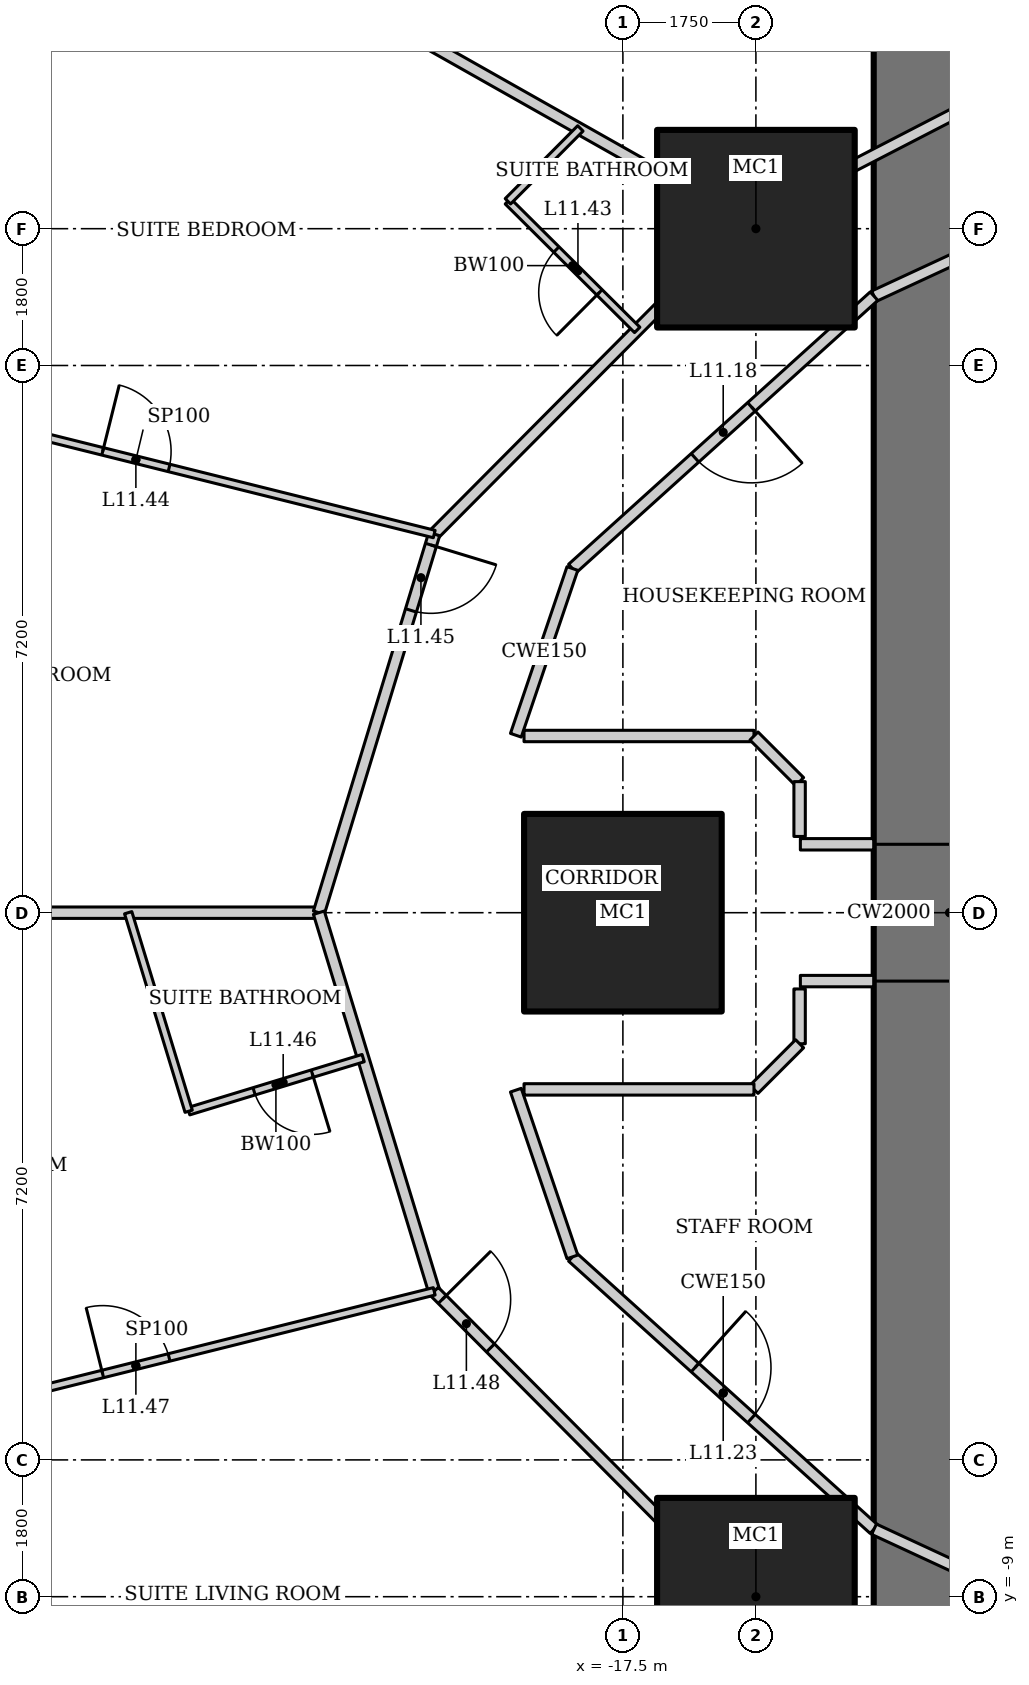
"""IFC4 building model, lengths in metres.
Left out: names, types, materials, properties, quantities, classifications, styles, units other than length and angle.
Written with IfcOpenShell. Run it as: python <this file> out.ifc"""

import sys

from ifc_helpers import new_model, si_unit, direction, frame, frame_2d, origin, origin_2d, place, context, subcontext, project, spatial, rectangle, hollow_rectangle, extrude, element, fill, save


model = new_model("IFC4")
c1 = context("Model", 3, precision=1e-05, world=origin(), true_north=direction((0.0, 1.0)))
c2 = subcontext(c1, "Body", "Model", "MODEL_VIEW")
j1 = project(units=[si_unit("LENGTHUNIT", "METRE"), si_unit("PLANEANGLEUNIT", "RADIAN")], contexts=[c1])
p1 = place(None, origin())
s1 = spatial("IfcSite", under=j1, at=p1, CompositionType="ELEMENT")
p2 = place(p1, origin())
s2 = spatial("IfcBuilding", under=s1, at=p2, CompositionType="ELEMENT")
p3 = place(p2, frame((0.0, 0.0, 55.0)))
s3 = spatial("IfcBuildingStorey", under=s2, at=p3, CompositionType="ELEMENT", Elevation=55.0)
for number, where, z_axis, x_axis in (
    (1, (-15.75, 9.0, 0.0), (0.0, 0.0, 1.0), (1.0, 0.0, 0.0)),
    (2, (-17.5, 0.0, 0.0), (0.0, 0.0, 1.0), (1.0, 0.0, 0.0)),
    (3, (-15.75, -9.0, 0.0), (0.0, 0.0, 1.0), (1.0, 0.0, 0.0)),
):
    element("IfcColumn", number, at=place(p3, frame(where, z_axis=z_axis, x_axis=x_axis)), inside=s3, PredefinedType="COLUMN", context=c2, shape_type="SweptSolid", body=[
        extrude(hollow_rectangle(XDim=2.6, YDim=2.6, WallThickness=0.13, at=origin_2d()), origin(), (0.0, 0.0, 1.0), 3.6),
    ])
p4 = place(p3, frame((-13.2, 13.0, 0.0), z_axis=(0.0, 0.0, 1.0), x_axis=(0.0, -1.0, 0.0)))
e4 = element("IfcWall", 4, at=p4, inside=s3, PredefinedType="SHEAR", context=c2, shape_type="SweptSolid", body=[
    extrude(rectangle(XDim=26.0, YDim=2.0, at=frame_2d((13.0, 0.0))), origin(), (0.0, 0.0, 1.0), 3.6),
])
p5 = place(p4, frame((12.1, 0.0, 0.0)))
e5 = element("IfcOpeningElement", 5, at=p5, cuts=e4, PredefinedType="OPENING", context=c2, shape_type="SweptSolid", body=[
    extrude(rectangle(XDim=1.8, YDim=2.1, at=frame_2d((0.9, 1.05))), frame((0.0, 1.01, 0.0), z_axis=(0.0, -1.0, 0.0), x_axis=(1.0, 0.0, 0.0)), (0.0, 0.0, 1.0), 2.02),
])
p6 = place(p3, frame((-24.4, 13.957, 0.0), z_axis=(0.0, 0.0, 1.0), x_axis=(-0.583937613703, -0.811798536155, 0.0)))
e6 = element("IfcWall", 6, at=p6, inside=s3, PredefinedType="SOLIDWALL", context=c2, shape_type="SweptSolid", body=[
    extrude(rectangle(XDim=8.323, YDim=0.2, at=frame_2d((4.162, 0.0))), origin(), (0.0, 0.0, 1.0), 3.45),
])
p7 = place(p6, frame((2.961, 0.0, 0.5)))
e7 = element("IfcOpeningElement", 7, at=p7, cuts=e6, PredefinedType="OPENING", context=c2, shape_type="SweptSolid", body=[
    extrude(rectangle(XDim=2.4, YDim=2.2, at=frame_2d((1.2, 1.1))), frame((0.0, 0.11, 0.0), z_axis=(0.0, -1.0, 0.0), x_axis=(1.0, 0.0, 0.0)), (0.0, 0.0, 1.0), 0.22),
])
p8 = place(p3, frame((-29.26, -7.2, 0.0), z_axis=(0.0, 0.0, 1.0), x_axis=(0.583937613703, -0.811798536155, 0.0)))
e8 = element("IfcWall", 8, at=p8, inside=s3, PredefinedType="SOLIDWALL", context=c2, shape_type="SweptSolid", body=[
    extrude(rectangle(XDim=8.323, YDim=0.2, at=frame_2d((4.162, 0.0))), origin(), (0.0, 0.0, 1.0), 3.45),
])
p9 = place(p8, frame((2.961, 0.0, 0.5)))
e9 = element("IfcOpeningElement", 9, at=p9, cuts=e8, PredefinedType="OPENING", context=c2, shape_type="SweptSolid", body=[
    extrude(rectangle(XDim=2.4, YDim=2.2, at=frame_2d((1.2, 1.1))), frame((0.0, 0.11, 0.0), z_axis=(0.0, -1.0, 0.0), x_axis=(1.0, 0.0, 0.0)), (0.0, 0.0, 1.0), 0.22),
])
p10 = place(p3, frame((-24.435, 13.909, 0.0), z_axis=(0.0, 0.0, 1.0), x_axis=(0.870612006791, -0.491970256856, 0.0)))
e10 = element("IfcWall", 10, at=p10, inside=s3, PredefinedType="PARTITIONING", context=c2, shape_type="SweptSolid", body=[
    extrude(rectangle(XDim=9.802, YDim=0.15, at=frame_2d((4.901, 0.0))), origin(), (0.0, 0.0, 1.0), 2.693),
])
p11 = place(p3, frame((-30.821, 0.0, 0.0), z_axis=(0.0, 0.0, 1.0), x_axis=(1.0, 0.0, 0.0)))
e11 = element("IfcWall", 11, at=p11, inside=s3, PredefinedType="PARTITIONING", context=c2, shape_type="SweptSolid", body=[
    extrude(rectangle(XDim=9.321, YDim=0.15, at=frame_2d((4.66, 0.0))), origin(), (0.0, 0.0, 1.0), 2.528),
])
p12 = place(p3, frame((-24.435, -13.909, 0.0), z_axis=(0.0, 0.0, 1.0), x_axis=(0.870612006791, 0.491970256856, 0.0)))
e12 = element("IfcWall", 12, at=p12, inside=s3, PredefinedType="PARTITIONING", context=c2, shape_type="SweptSolid", body=[
    extrude(rectangle(XDim=9.802, YDim=0.15, at=frame_2d((4.901, 0.0))), origin(), (0.0, 0.0, 1.0), 2.693),
])
p13 = place(p3, frame((-11.147, 11.544, 0.0), z_axis=(0.0, 0.0, 1.0), x_axis=(-0.888333171507, -0.459199495209, 0.0)))
e13 = element("IfcWall", 13, at=p13, inside=s3, PredefinedType="PARTITIONING", context=c2, shape_type="SweptSolid", body=[
    extrude(rectangle(XDim=5.351, YDim=0.15, at=frame_2d((2.676, 0.0))), origin(), (0.0, 0.0, 1.0), 3.45),
])
p14 = place(p13, frame((0.15, 0.0, 0.0)))
e14 = element("IfcOpeningElement", 14, at=p14, cuts=e13, PredefinedType="OPENING", context=c2, shape_type="SweptSolid", body=[
    extrude(rectangle(XDim=0.9, YDim=2.1, at=frame_2d((0.45, 1.05))), frame((0.0, 0.085, 0.0), z_axis=(0.0, -1.0, 0.0), x_axis=(1.0, 0.0, 0.0)), (0.0, 0.0, 1.0), 0.17),
])
p15 = place(p3, frame((-15.901, 9.086, 0.0), z_axis=(0.0, 0.0, 1.0), x_axis=(-0.705121546414, -0.709086457904, 0.0)))
e15 = element("IfcWall", 15, at=p15, inside=s3, PredefinedType="PARTITIONING", context=c2, shape_type="SweptSolid", body=[
    extrude(rectangle(XDim=5.788, YDim=0.15, at=frame_2d((2.894, 0.0))), origin(), (0.0, 0.0, 1.0), 3.45),
])
p16 = place(p3, frame((-19.982, 4.982, 0.0), z_axis=(0.0, 0.0, 1.0), x_axis=(-0.291383581394, -0.95660629754, 0.0)))
e16 = element("IfcWall", 16, at=p16, inside=s3, PredefinedType="PARTITIONING", context=c2, shape_type="SweptSolid", body=[
    extrude(rectangle(XDim=5.208, YDim=0.15, at=frame_2d((2.604, 0.0))), origin(), (0.0, 0.0, 1.0), 3.45),
])
p17 = place(p16, frame((0.15, 0.0, 0.0)))
e17 = element("IfcOpeningElement", 17, at=p17, cuts=e16, PredefinedType="OPENING", context=c2, shape_type="SweptSolid", body=[
    extrude(rectangle(XDim=0.9, YDim=2.1, at=frame_2d((0.45, 1.05))), frame((0.0, 0.085, 0.0), z_axis=(0.0, -1.0, 0.0), x_axis=(1.0, 0.0, 0.0)), (0.0, 0.0, 1.0), 0.17),
])
p18 = place(p3, frame((-21.5, 0.0, 0.0), z_axis=(0.0, 0.0, 1.0), x_axis=(0.291383581394, -0.95660629754, 0.0)))
e18 = element("IfcWall", 18, at=p18, inside=s3, PredefinedType="PARTITIONING", context=c2, shape_type="SweptSolid", body=[
    extrude(rectangle(XDim=5.208, YDim=0.15, at=frame_2d((2.604, 0.0))), origin(), (0.0, 0.0, 1.0), 3.45),
])
p19 = place(p3, frame((-19.982, -4.982, 0.0), z_axis=(0.0, 0.0, 1.0), x_axis=(0.705121546414, -0.709086457904, 0.0)))
e19 = element("IfcWall", 19, at=p19, inside=s3, PredefinedType="PARTITIONING", context=c2, shape_type="SweptSolid", body=[
    extrude(rectangle(XDim=5.788, YDim=0.15, at=frame_2d((2.894, 0.0))), origin(), (0.0, 0.0, 1.0), 3.45),
])
p20 = place(p19, frame((0.15, 0.0, 0.0)))
e20 = element("IfcOpeningElement", 20, at=p20, cuts=e19, PredefinedType="OPENING", context=c2, shape_type="SweptSolid", body=[
    extrude(rectangle(XDim=0.9, YDim=2.1, at=frame_2d((0.45, 1.05))), frame((0.0, 0.085, 0.0), z_axis=(0.0, -1.0, 0.0), x_axis=(1.0, 0.0, 0.0)), (0.0, 0.0, 1.0), 0.17),
])
p21 = place(p3, frame((-15.901, -9.086, 0.0), z_axis=(0.0, 0.0, 1.0), x_axis=(0.888333171507, -0.459199495209, 0.0)))
e21 = element("IfcWall", 21, at=p21, inside=s3, PredefinedType="PARTITIONING", context=c2, shape_type="SweptSolid", body=[
    extrude(rectangle(XDim=5.351, YDim=0.15, at=frame_2d((2.676, 0.0))), origin(), (0.0, 0.0, 1.0), 3.45),
])
p22 = place(p21, frame((4.301, 0.0, 0.0)))
e22 = element("IfcOpeningElement", 22, at=p22, cuts=e21, PredefinedType="OPENING", context=c2, shape_type="SweptSolid", body=[
    extrude(rectangle(XDim=0.9, YDim=2.1, at=frame_2d((0.45, 1.05))), frame((0.0, 0.085, 0.0), z_axis=(0.0, -1.0, 0.0), x_axis=(1.0, 0.0, 0.0)), (0.0, 0.0, 1.0), 0.17),
])
p23 = place(p3, frame((-9.801, 10.149, 0.0), z_axis=(0.0, 0.0, 1.0), x_axis=(-0.907279653965, -0.420527798727, 0.0)))
e23 = element("IfcWall", 23, at=p23, inside=s3, PredefinedType="PARTITIONING", context=c2, shape_type="SweptSolid", body=[
    extrude(rectangle(XDim=4.844, YDim=0.15, at=frame_2d((2.422, 0.0))), origin(), (0.0, 0.0, 1.0), 3.45),
])
p24 = place(p3, frame((-14.196, 8.112, 0.0), z_axis=(0.0, 0.0, 1.0), x_axis=(-0.742194222, -0.670184852731, 0.0)))
e24 = element("IfcWall", 24, at=p24, inside=s3, PredefinedType="PARTITIONING", context=c2, shape_type="SweptSolid", body=[
    extrude(rectangle(XDim=5.347, YDim=0.15, at=frame_2d((2.673, 0.0))), origin(), (0.0, 0.0, 1.0), 3.45),
])
p25 = place(p24, frame((2.173, 0.0, 0.0)))
e25 = element("IfcOpeningElement", 25, at=p25, cuts=e24, PredefinedType="OPENING", context=c2, shape_type="SweptSolid", body=[
    extrude(rectangle(XDim=1.0, YDim=2.1, at=frame_2d((0.5, 1.05))), frame((0.0, 0.085, 0.0), z_axis=(0.0, -1.0, 0.0), x_axis=(1.0, 0.0, 0.0)), (0.0, 0.0, 1.0), 0.17),
])
p26 = place(p3, frame((-18.164, -4.529, 0.0), z_axis=(0.0, 0.0, 1.0), x_axis=(0.742194222, -0.670184852731, 0.0)))
e26 = element("IfcWall", 26, at=p26, inside=s3, PredefinedType="PARTITIONING", context=c2, shape_type="SweptSolid", body=[
    extrude(rectangle(XDim=5.347, YDim=0.15, at=frame_2d((2.673, 0.0))), origin(), (0.0, 0.0, 1.0), 3.45),
])
p27 = place(p26, frame((2.173, 0.0, 0.0)))
e27 = element("IfcOpeningElement", 27, at=p27, cuts=e26, PredefinedType="OPENING", context=c2, shape_type="SweptSolid", body=[
    extrude(rectangle(XDim=1.0, YDim=2.1, at=frame_2d((0.5, 1.05))), frame((0.0, 0.085, 0.0), z_axis=(0.0, -1.0, 0.0), x_axis=(1.0, 0.0, 0.0)), (0.0, 0.0, 1.0), 0.17),
])
p28 = place(p3, frame((-14.196, -8.112, 0.0), z_axis=(0.0, 0.0, 1.0), x_axis=(0.907279653965, -0.420527798727, 0.0)))
e28 = element("IfcWall", 28, at=p28, inside=s3, PredefinedType="PARTITIONING", context=c2, shape_type="SweptSolid", body=[
    extrude(rectangle(XDim=4.844, YDim=0.15, at=frame_2d((2.422, 0.0))), origin(), (0.0, 0.0, 1.0), 3.45),
])
p29 = place(p3, frame((-17.311, 7.668, 0.0), z_axis=(0.0, 0.0, 1.0), x_axis=(-0.709138392716, 0.705069315724, 0.0)))
e29 = element("IfcWall", 29, at=p29, inside=s3, PredefinedType="PARTITIONING", context=c2, shape_type="SweptSolid", body=[
    extrude(rectangle(XDim=2.4, YDim=0.1, at=frame_2d((1.2, 0.0))), origin(), (0.0, 0.0, 1.0), 3.45),
])
p30 = place(p29, frame((0.7, 0.0, 0.0)))
e30 = element("IfcOpeningElement", 30, at=p30, cuts=e29, PredefinedType="OPENING", context=c2, shape_type="SweptSolid", body=[
    extrude(rectangle(XDim=0.8, YDim=2.1, at=frame_2d((0.4, 1.05))), frame((0.0, 0.06, 0.0), z_axis=(0.0, -1.0, 0.0), x_axis=(1.0, 0.0, 0.0)), (0.0, 0.0, 1.0), 0.12),
])
p31 = place(p3, frame((-19.013, 9.36, 0.0), z_axis=(0.0, 0.0, 1.0), x_axis=(0.7051187611, 0.709089227633, 0.0)))
e31 = element("IfcWall", 31, at=p31, inside=s3, PredefinedType="PARTITIONING", context=c2, shape_type="SweptSolid", body=[
    extrude(rectangle(XDim=1.353, YDim=0.1, at=frame_2d((0.676, 0.0))), origin(), (0.0, 0.0, 1.0), 3.45),
])
p32 = place(p3, frame((-27.833, 6.939, 0.0), z_axis=(0.0, 0.0, 1.0), x_axis=(0.97029673161, -0.24191786339, 0.0)))
e32 = element("IfcWall", 32, at=p32, inside=s3, PredefinedType="PARTITIONING", context=c2, shape_type="SweptSolid", body=[
    extrude(rectangle(XDim=8.091, YDim=0.1, at=frame_2d((4.045, 0.0))), origin(), (0.0, 0.0, 1.0), 2.333),
])
p33 = place(p32, frame((3.595, 0.0, 0.0)))
e33 = element("IfcOpeningElement", 33, at=p33, cuts=e32, PredefinedType="OPENING", context=c2, shape_type="SweptSolid", body=[
    extrude(rectangle(XDim=0.9, YDim=2.1, at=frame_2d((0.45, 1.05))), frame((0.0, 0.06, 0.0), z_axis=(0.0, -1.0, 0.0), x_axis=(1.0, 0.0, 0.0)), (0.0, 0.0, 1.0), 0.12),
])
p34 = place(p3, frame((-20.917, -1.913, 0.0), z_axis=(0.0, 0.0, 1.0), x_axis=(-0.956591303063, -0.291432803411, 0.0)))
e34 = element("IfcWall", 34, at=p34, inside=s3, PredefinedType="PARTITIONING", context=c2, shape_type="SweptSolid", body=[
    extrude(rectangle(XDim=2.4, YDim=0.1, at=frame_2d((1.2, 0.0))), origin(), (0.0, 0.0, 1.0), 3.45),
])
p35 = place(p34, frame((0.7, 0.0, 0.0)))
e35 = element("IfcOpeningElement", 35, at=p35, cuts=e34, PredefinedType="OPENING", context=c2, shape_type="SweptSolid", body=[
    extrude(rectangle(XDim=0.8, YDim=2.1, at=frame_2d((0.4, 1.05))), frame((0.0, 0.06, 0.0), z_axis=(0.0, -1.0, 0.0), x_axis=(1.0, 0.0, 0.0)), (0.0, 0.0, 1.0), 0.12),
])
p36 = place(p3, frame((-23.213, -2.613, 0.0), z_axis=(0.0, 0.0, 1.0), x_axis=(-0.291339473488, 0.956619731757, 0.0)))
e36 = element("IfcWall", 36, at=p36, inside=s3, PredefinedType="PARTITIONING", context=c2, shape_type="SweptSolid", body=[
    extrude(rectangle(XDim=2.731, YDim=0.1, at=frame_2d((1.365, 0.0))), origin(), (0.0, 0.0, 1.0), 3.45),
])
p37 = place(p3, frame((-27.833, -6.939, 0.0), z_axis=(0.0, 0.0, 1.0), x_axis=(0.97029673161, 0.24191786339, 0.0)))
e37 = element("IfcWall", 37, at=p37, inside=s3, PredefinedType="PARTITIONING", context=c2, shape_type="SweptSolid", body=[
    extrude(rectangle(XDim=8.091, YDim=0.1, at=frame_2d((4.045, 0.0))), origin(), (0.0, 0.0, 1.0), 2.333),
])
p38 = place(p37, frame((3.595, 0.0, 0.0)))
e38 = element("IfcOpeningElement", 38, at=p38, cuts=e37, PredefinedType="OPENING", context=c2, shape_type="SweptSolid", body=[
    extrude(rectangle(XDim=0.9, YDim=2.1, at=frame_2d((0.45, 1.05))), frame((0.0, 0.06, 0.0), z_axis=(0.0, -1.0, 0.0), x_axis=(1.0, 0.0, 0.0)), (0.0, 0.0, 1.0), 0.12),
])
for number, where, z_axis, x_axis in (
    (39, (-18.164, 4.529, 0.0), (0.0, 0.0, 1.0), (-0.321, -0.947, 0.0)),
    (40, (-18.908, -2.335, 0.0), (0.0, 0.0, 1.0), (0.321, -0.947, 0.0)),
):
    element("IfcWall", number, at=place(p3, frame(where, z_axis=z_axis, x_axis=x_axis)), inside=s3, PredefinedType="PARTITIONING", context=c2, shape_type="SweptSolid", body=[
        extrude(rectangle(XDim=2.317, YDim=0.15, at=frame_2d((1.158, 0.0))), origin(), (0.0, 0.0, 1.0), 3.45),
    ])
for number, where, z_axis, x_axis in (
    (41, (-14.2, -0.9, 0.0), (0.0, 0.0, 1.0), (-1.0, 0.0, 0.0)),
    (42, (-14.2, 0.9, 0.0), (0.0, 0.0, 1.0), (-1.0, 0.0, 0.0)),
):
    element("IfcWall", number, at=place(p3, frame(where, z_axis=z_axis, x_axis=x_axis)), inside=s3, PredefinedType="PARTITIONING", context=c2, shape_type="SweptSolid", body=[
        extrude(rectangle(XDim=0.965, YDim=0.15, at=frame_2d((0.482, 0.0))), origin(), (0.0, 0.0, 1.0), 3.45),
    ])
p39 = place(p3, frame((-18.801, 2.325, 0.0), z_axis=(0.0, 0.0, 1.0), x_axis=(1.0, 0.0, 0.0)))
e43 = element("IfcWall", 43, at=p39, inside=s3, PredefinedType="PARTITIONING", context=c2, shape_type="SweptSolid", body=[
    extrude(rectangle(XDim=3.025, YDim=0.15, at=frame_2d((1.513, 0.0))), origin(), (0.0, 0.0, 1.0), 3.45),
])
p40 = place(p3, frame((-15.775, 2.325, 0.0), z_axis=(0.0, 0.0, 1.0), x_axis=(0.707106781187, -0.707106781187, 0.0)))
e44 = element("IfcWall", 44, at=p40, inside=s3, PredefinedType="PARTITIONING", context=c2, shape_type="SweptSolid", body=[
    extrude(rectangle(XDim=0.849, YDim=0.15, at=frame_2d((0.425, 0.0))), origin(), (0.0, 0.0, 1.0), 3.45),
])
for number, where, z_axis, x_axis in (
    (45, (-15.175, 1.725, 0.0), (0.0, 0.0, 1.0), (0.0, -1.0, 0.0)),
    (46, (-15.175, -1.003, 0.0), (0.0, 0.0, 1.0), (0.0, -1.0, 0.0)),
):
    element("IfcWall", number, at=place(p3, frame(where, z_axis=z_axis, x_axis=x_axis)), inside=s3, PredefinedType="PARTITIONING", context=c2, shape_type="SweptSolid", body=[
        extrude(rectangle(XDim=0.721, YDim=0.15, at=frame_2d((0.361, 0.0))), origin(), (0.0, 0.0, 1.0), 3.45),
    ])
p41 = place(p3, frame((-15.175, -1.725, 0.0), z_axis=(0.0, 0.0, 1.0), x_axis=(-0.707106781187, -0.707106781187, 0.0)))
e47 = element("IfcWall", 47, at=p41, inside=s3, PredefinedType="PARTITIONING", context=c2, shape_type="SweptSolid", body=[
    extrude(rectangle(XDim=0.849, YDim=0.15, at=frame_2d((0.425, 0.0))), origin(), (0.0, 0.0, 1.0), 3.45),
])
p42 = place(p3, frame((-15.775, -2.325, 0.0), z_axis=(0.0, 0.0, 1.0), x_axis=(-1.0, 0.0, 0.0)))
e48 = element("IfcWall", 48, at=p42, inside=s3, PredefinedType="PARTITIONING", context=c2, shape_type="SweptSolid", body=[
    extrude(rectangle(XDim=3.025, YDim=0.15, at=frame_2d((1.513, 0.0))), origin(), (0.0, 0.0, 1.0), 3.45),
])
p43 = place(p5, origin())
e49 = element("IfcDoor", 49, at=p43, inside=s3, OperationType="DOUBLE_DOOR_DOUBLE_SWING", PredefinedType="DOOR", context=c2, shape_type="SweptSolid", body=[
    extrude(rectangle(XDim=1.8, YDim=2.1, at=frame_2d((0.9, 1.05))), frame((0.0, 0.025, 0.0), z_axis=(0.0, -1.0, 0.0), x_axis=(1.0, 0.0, 0.0)), (0.0, 0.0, 1.0), 0.05),
])
fill(e5, e49)
p44 = place(p25, origin())
e50 = element("IfcDoor", 50, at=p44, inside=s3, OperationType="SINGLE_SWING_LEFT", PredefinedType="DOOR", context=c2, shape_type="SweptSolid", body=[
    extrude(rectangle(XDim=1.0, YDim=2.1, at=frame_2d((0.5, 1.05))), frame((0.0, 0.025, 0.0), z_axis=(0.0, -1.0, 0.0), x_axis=(1.0, 0.0, 0.0)), (0.0, 0.0, 1.0), 0.05),
])
fill(e25, e50)
p45 = place(p27, origin())
e51 = element("IfcDoor", 51, at=p45, inside=s3, OperationType="SINGLE_SWING_LEFT", PredefinedType="DOOR", context=c2, shape_type="SweptSolid", body=[
    extrude(rectangle(XDim=1.0, YDim=2.1, at=frame_2d((0.5, 1.05))), frame((0.0, 0.025, 0.0), z_axis=(0.0, -1.0, 0.0), x_axis=(1.0, 0.0, 0.0)), (0.0, 0.0, 1.0), 0.05),
])
fill(e27, e51)
p46 = place(p30, origin())
e52 = element("IfcDoor", 52, at=p46, inside=s3, OperationType="SINGLE_SWING_LEFT", PredefinedType="DOOR", context=c2, shape_type="SweptSolid", body=[
    extrude(rectangle(XDim=0.8, YDim=2.1, at=frame_2d((0.4, 1.05))), frame((0.0, 0.025, 0.0), z_axis=(0.0, -1.0, 0.0), x_axis=(1.0, 0.0, 0.0)), (0.0, 0.0, 1.0), 0.05),
])
fill(e30, e52)
p47 = place(p33, origin())
e53 = element("IfcDoor", 53, at=p47, inside=s3, OperationType="SINGLE_SWING_LEFT", PredefinedType="DOOR", context=c2, shape_type="SweptSolid", body=[
    extrude(rectangle(XDim=0.9, YDim=2.1, at=frame_2d((0.45, 1.05))), frame((0.0, 0.025, 0.0), z_axis=(0.0, -1.0, 0.0), x_axis=(1.0, 0.0, 0.0)), (0.0, 0.0, 1.0), 0.05),
])
fill(e33, e53)
p48 = place(p17, origin())
e54 = element("IfcDoor", 54, at=p48, inside=s3, OperationType="SINGLE_SWING_LEFT", PredefinedType="DOOR", context=c2, shape_type="SweptSolid", body=[
    extrude(rectangle(XDim=0.9, YDim=2.1, at=frame_2d((0.45, 1.05))), frame((0.0, 0.025, 0.0), z_axis=(0.0, -1.0, 0.0), x_axis=(1.0, 0.0, 0.0)), (0.0, 0.0, 1.0), 0.05),
])
fill(e17, e54)
p49 = place(p35, origin())
e55 = element("IfcDoor", 55, at=p49, inside=s3, OperationType="SINGLE_SWING_LEFT", PredefinedType="DOOR", context=c2, shape_type="SweptSolid", body=[
    extrude(rectangle(XDim=0.8, YDim=2.1, at=frame_2d((0.4, 1.05))), frame((0.0, 0.025, 0.0), z_axis=(0.0, -1.0, 0.0), x_axis=(1.0, 0.0, 0.0)), (0.0, 0.0, 1.0), 0.05),
])
fill(e35, e55)
p50 = place(p38, origin())
e56 = element("IfcDoor", 56, at=p50, inside=s3, OperationType="SINGLE_SWING_LEFT", PredefinedType="DOOR", context=c2, shape_type="SweptSolid", body=[
    extrude(rectangle(XDim=0.9, YDim=2.1, at=frame_2d((0.45, 1.05))), frame((0.0, 0.025, 0.0), z_axis=(0.0, -1.0, 0.0), x_axis=(1.0, 0.0, 0.0)), (0.0, 0.0, 1.0), 0.05),
])
fill(e38, e56)
p51 = place(p20, origin())
e57 = element("IfcDoor", 57, at=p51, inside=s3, OperationType="SINGLE_SWING_LEFT", PredefinedType="DOOR", context=c2, shape_type="SweptSolid", body=[
    extrude(rectangle(XDim=0.9, YDim=2.1, at=frame_2d((0.45, 1.05))), frame((0.0, 0.025, 0.0), z_axis=(0.0, -1.0, 0.0), x_axis=(1.0, 0.0, 0.0)), (0.0, 0.0, 1.0), 0.05),
])
fill(e20, e57)
save(model, sys.argv[1])
